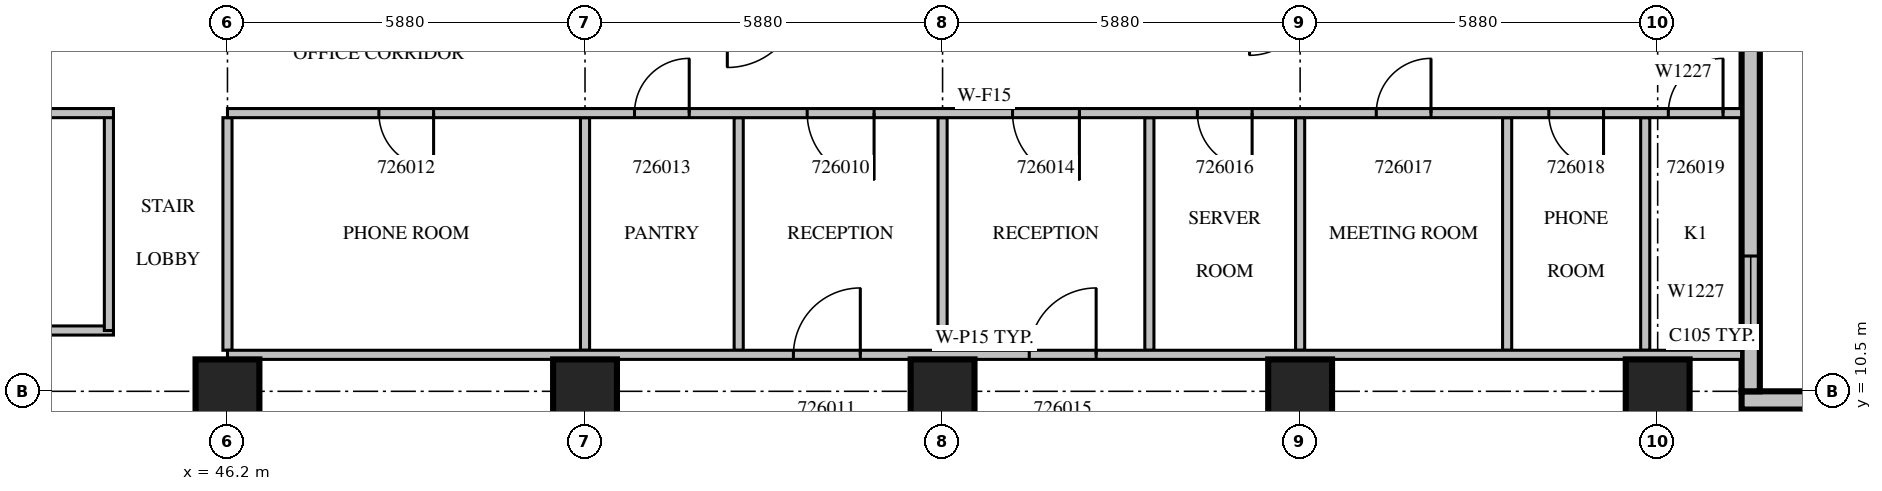
"""IFC4 building model, lengths in metres.
Left out: names, types, materials, properties, quantities, classifications, styles, units other than length and angle.
Written with IfcOpenShell. Run it as: python <this file> out.ifc"""

import sys

from ifc_helpers import new_model, si_unit, direction, frame, frame_2d, origin, origin_2d, place, context, subcontext, project, spatial, rectangle, extrude, source, transform, mapped, element, fill, save


model = new_model("IFC4")
c1 = context("Model", 3, precision=1e-05, world=origin(), true_north=direction((0.0, 1.0)))
c2 = subcontext(c1, "Body", "Model", "MODEL_VIEW")
j1 = project(units=[si_unit("LENGTHUNIT", "METRE"), si_unit("PLANEANGLEUNIT", "RADIAN")], contexts=[c1])
p1 = place(None, origin())
s1 = spatial("IfcSite", under=j1, at=p1, CompositionType="ELEMENT")
p2 = place(p1, origin())
s2 = spatial("IfcBuilding", under=s1, at=p2, CompositionType="ELEMENT")
p3 = place(p2, frame((0.0, 0.0, 120.3)))
s3 = spatial("IfcBuildingStorey", under=s2, at=p3, CompositionType="ELEMENT", Elevation=120.3)
m1 = source(origin(), c2, "Body", "SweptSolid", [
    extrude(rectangle(XDim=1.05, YDim=1.05, at=origin_2d()), origin(), (0.0, 0.0, 1.0), 4.2),
])
for number, where, z_axis, x_axis in (
    (1, (46.2, 10.5, 0.0), (0.0, 0.0, 1.0), (1.0, 0.0, 0.0)),
    (2, (52.08, 10.5, 0.0), (0.0, 0.0, 1.0), (1.0, 0.0, 0.0)),
    (3, (57.96, 10.5, 0.0), (0.0, 0.0, 1.0), (1.0, 0.0, 0.0)),
    (4, (63.84, 10.5, 0.0), (0.0, 0.0, 1.0), (1.0, 0.0, 0.0)),
    (5, (69.72, 10.5, 0.0), (0.0, 0.0, 1.0), (1.0, 0.0, 0.0)),
):
    element("IfcColumn", number, at=place(p3, frame(where, z_axis=z_axis, x_axis=x_axis)), inside=s3, PredefinedType="COLUMN", context=c2, shape_type="MappedRepresentation", body=[
        mapped(m1, transform((0.0, 0.0, 0.0), scale=1.0)),
    ])
m2 = source(origin(), c2, "Body", "SweptSolid", [
    extrude(rectangle(XDim=1.2, YDim=0.3, at=frame_2d((0.6, 0.0))), origin(), (0.0, 0.0, 1.0), 3.8),
])
p4 = place(p3, frame((71.1, 10.35, 0.0), z_axis=(0.0, 0.0, 1.0), x_axis=(1.0, 0.0, 0.0)))
e6 = element("IfcWall", 6, at=p4, inside=s3, PredefinedType="STANDARD", context=c2, shape_type="MappedRepresentation", body=[
    mapped(m2, transform((0.0, 0.0, 0.0), scale=1.0)),
])
m3 = source(origin(), c2, "Body", "SweptSolid", [
    extrude(rectangle(XDim=6.3, YDim=0.3, at=frame_2d((3.15, 0.0))), origin(), (0.0, 0.0, 1.0), 3.8),
])
p5 = place(p3, frame((71.25, 10.5, 0.0), z_axis=(0.0, 0.0, 1.0), x_axis=(0.0, 1.0, 0.0)))
e7 = element("IfcWall", 7, at=p5, inside=s3, PredefinedType="STANDARD", context=c2, shape_type="MappedRepresentation", body=[
    mapped(m3, transform((0.0, 0.0, 0.0), scale=1.0)),
])
m4 = source(origin(), c2, "Body", "SweptSolid", [
    extrude(rectangle(XDim=1.2, YDim=2.7, at=frame_2d((0.6, 1.35))), frame((0.0, 0.16, 0.0), z_axis=(0.0, -1.0, 0.0), x_axis=(1.0, 0.0, 0.0)), (0.0, 0.0, 1.0), 0.32),
])
p6 = place(p5, frame((1.025, 0.0, 0.6)))
e8 = element("IfcOpeningElement", 8, at=p6, cuts=e7, PredefinedType="OPENING", context=c2, shape_type="MappedRepresentation", body=[
    mapped(m4, transform((0.0, 0.0, 0.0), scale=1.0)),
])
m5 = source(origin(), c2, "Body", "SweptSolid", [
    extrude(rectangle(XDim=6.45, YDim=0.15, at=frame_2d((3.225, 0.0))), origin(), (0.0, 0.0, 1.0), 3.8),
])
p7 = place(p3, frame((37.875, 11.5, 0.0), z_axis=(0.0, 0.0, 1.0), x_axis=(1.0, 0.0, 0.0)))
e9 = element("IfcWall", 9, at=p7, inside=s3, PredefinedType="PARTITIONING", context=c2, shape_type="MappedRepresentation", body=[
    mapped(m5, transform((0.0, 0.0, 0.0), scale=1.0)),
])
m6 = source(origin(), c2, "Body", "SweptSolid", [
    extrude(rectangle(XDim=3.575, YDim=0.15, at=frame_2d((1.788, 0.0))), origin(), (0.0, 0.0, 1.0), 3.8),
])
p8 = place(p3, frame((44.25, 11.5, 0.0), z_axis=(0.0, 0.0, 1.0), x_axis=(0.0, 1.0, 0.0)))
e10 = element("IfcWall", 10, at=p8, inside=s3, PredefinedType="PARTITIONING", context=c2, shape_type="MappedRepresentation", body=[
    mapped(m6, transform((0.0, 0.0, 0.0), scale=1.0)),
])
p9 = place(p3, frame((44.325, 15.075, 0.0), z_axis=(0.0, 0.0, 1.0), x_axis=(-1.0, 0.0, 0.0)))
e11 = element("IfcWall", 11, at=p9, inside=s3, PredefinedType="PARTITIONING", context=c2, shape_type="MappedRepresentation", body=[
    mapped(m5, transform((0.0, 0.0, 0.0), scale=1.0)),
])
m7 = source(origin(), c2, "Body", "SweptSolid", [
    extrude(rectangle(XDim=0.9, YDim=2.1, at=frame_2d((0.45, 1.05))), frame((0.0, 0.085, 0.0), z_axis=(0.0, -1.0, 0.0), x_axis=(1.0, 0.0, 0.0)), (0.0, 0.0, 1.0), 0.17),
])
p10 = place(p9, frame((2.812, 0.0, 0.0)))
e12 = element("IfcOpeningElement", 12, at=p10, cuts=e11, PredefinedType="OPENING", context=c2, shape_type="MappedRepresentation", body=[
    mapped(m7, transform((0.0, 0.0, 0.0), scale=1.0)),
])
m8 = source(origin(), c2, "Body", "SweptSolid", [
    extrude(rectangle(XDim=3.825, YDim=0.15, at=frame_2d((1.913, 0.0))), origin(), (0.0, 0.0, 1.0), 3.8),
])
for number, where, z_axis, x_axis in (
    (13, (52.08, 11.175, 0.0), (0.0, 0.0, 1.0), (0.0, 1.0, 0.0)),
    (14, (54.607, 11.175, 0.0), (0.0, 0.0, 1.0), (0.0, 1.0, 0.0)),
    (15, (61.361, 11.175, 0.0), (0.0, 0.0, 1.0), (0.0, 1.0, 0.0)),
    (16, (63.84, 11.175, 0.0), (0.0, 0.0, 1.0), (0.0, 1.0, 0.0)),
    (17, (67.244, 11.175, 0.0), (0.0, 0.0, 1.0), (0.0, 1.0, 0.0)),
    (18, (69.515, 11.175, 0.0), (0.0, 0.0, 1.0), (0.0, 1.0, 0.0)),
    (19, (46.2, 11.175, 0.0), (0.0, 0.0, 1.0), (0.0, 1.0, 0.0)),
    (20, (57.96, 11.175, 0.0), (0.0, 0.0, 1.0), (0.0, 1.0, 0.0)),
):
    element("IfcWall", number, at=place(p3, frame(where, z_axis=z_axis, x_axis=x_axis)), inside=s3, PredefinedType="PARTITIONING", context=c2, shape_type="MappedRepresentation", body=[
        mapped(m8, transform((0.0, 0.0, 0.0), scale=1.0)),
    ])
m9 = source(origin(), c2, "Body", "SweptSolid", [
    extrude(rectangle(XDim=24.9, YDim=0.15, at=frame_2d((12.45, 0.0))), origin(), (0.0, 0.0, 1.0), 3.8),
])
p11 = place(p3, frame((71.1, 11.1, 0.0), z_axis=(0.0, 0.0, 1.0), x_axis=(-1.0, 0.0, 0.0)))
e21 = element("IfcWall", 21, at=p11, inside=s3, PredefinedType="PARTITIONING", context=c2, shape_type="MappedRepresentation", body=[
    mapped(m9, transform((0.0, 0.0, 0.0), scale=1.0)),
])
m10 = source(origin(), c2, "Body", "SweptSolid", [
    extrude(rectangle(XDim=1.1, YDim=2.1, at=frame_2d((0.55, 1.05))), frame((0.0, 0.085, 0.0), z_axis=(0.0, -1.0, 0.0), x_axis=(1.0, 0.0, 0.0)), (0.0, 0.0, 1.0), 0.17),
])
p12 = place(p11, frame((14.493, 0.0, 0.0)))
e22 = element("IfcOpeningElement", 22, at=p12, cuts=e21, PredefinedType="OPENING", context=c2, shape_type="MappedRepresentation", body=[
    mapped(m10, transform((0.0, 0.0, 0.0), scale=1.0)),
])
p13 = place(p11, frame((10.614, 0.0, 0.0)))
e23 = element("IfcOpeningElement", 23, at=p13, cuts=e21, PredefinedType="OPENING", context=c2, shape_type="MappedRepresentation", body=[
    mapped(m10, transform((0.0, 0.0, 0.0), scale=1.0)),
])
p14 = place(p3, frame((71.1, 15.075, 0.0), z_axis=(0.0, 0.0, 1.0), x_axis=(-1.0, 0.0, 0.0)))
e24 = element("IfcWall", 24, at=p14, inside=s3, PredefinedType="PARTITIONING", context=c2, shape_type="MappedRepresentation", body=[
    mapped(m9, transform((0.0, 0.0, 0.0), scale=1.0)),
])
p15 = place(p14, frame((14.266, 0.0, 0.0)))
e25 = element("IfcOpeningElement", 25, at=p15, cuts=e24, PredefinedType="OPENING", context=c2, shape_type="MappedRepresentation", body=[
    mapped(m10, transform((0.0, 0.0, 0.0), scale=1.0)),
])
p16 = place(p14, frame((21.51, 0.0, 0.0)))
e26 = element("IfcOpeningElement", 26, at=p16, cuts=e24, PredefinedType="OPENING", context=c2, shape_type="MappedRepresentation", body=[
    mapped(m7, transform((0.0, 0.0, 0.0), scale=1.0)),
])
p17 = place(p14, frame((17.306, 0.0, 0.0)))
e27 = element("IfcOpeningElement", 27, at=p17, cuts=e24, PredefinedType="OPENING", context=c2, shape_type="MappedRepresentation", body=[
    mapped(m7, transform((0.0, 0.0, 0.0), scale=1.0)),
])
p18 = place(p14, frame((10.889, 0.0, 0.0)))
e28 = element("IfcOpeningElement", 28, at=p18, cuts=e24, PredefinedType="OPENING", context=c2, shape_type="MappedRepresentation", body=[
    mapped(m10, transform((0.0, 0.0, 0.0), scale=1.0)),
])
p19 = place(p14, frame((8.05, 0.0, 0.0)))
e29 = element("IfcOpeningElement", 29, at=p19, cuts=e24, PredefinedType="OPENING", context=c2, shape_type="MappedRepresentation", body=[
    mapped(m7, transform((0.0, 0.0, 0.0), scale=1.0)),
])
p20 = place(p14, frame((5.108, 0.0, 0.0)))
e30 = element("IfcOpeningElement", 30, at=p20, cuts=e24, PredefinedType="OPENING", context=c2, shape_type="MappedRepresentation", body=[
    mapped(m7, transform((0.0, 0.0, 0.0), scale=1.0)),
])
p21 = place(p14, frame((2.27, 0.0, 0.0)))
e31 = element("IfcOpeningElement", 31, at=p21, cuts=e24, PredefinedType="OPENING", context=c2, shape_type="MappedRepresentation", body=[
    mapped(m7, transform((0.0, 0.0, 0.0), scale=1.0)),
])
p22 = place(p14, frame((0.305, 0.0, 0.0)))
e32 = element("IfcOpeningElement", 32, at=p22, cuts=e24, PredefinedType="OPENING", context=c2, shape_type="MappedRepresentation", body=[
    mapped(m7, transform((0.0, 0.0, 0.0), scale=1.0)),
])
m11 = source(origin(), c2, "Body", "SweptSolid", [
    extrude(rectangle(XDim=1.2, YDim=2.7, at=frame_2d((0.6, 1.35))), frame((0.0, 0.03, 0.0), z_axis=(0.0, -1.0, 0.0), x_axis=(1.0, 0.0, 0.0)), (0.0, 0.0, 1.0), 0.06),
])
p23 = place(p6, origin())
e33 = element("IfcWindow", 33, at=p23, inside=s3, PartitioningType="SINGLE_PANEL", PredefinedType="WINDOW", context=c2, shape_type="MappedRepresentation", body=[
    mapped(m11, transform((0.0, 0.0, 0.0), scale=1.0)),
])
fill(e8, e33)
m12 = source(origin(), c2, "Body", "SweptSolid", [
    extrude(rectangle(XDim=1.1, YDim=2.1, at=frame_2d((0.55, 1.05))), frame((0.0, 0.025, 0.0), z_axis=(0.0, -1.0, 0.0), x_axis=(1.0, 0.0, 0.0)), (0.0, 0.0, 1.0), 0.05),
])
p24 = place(p15, origin())
e34 = element("IfcDoor", 34, at=p24, inside=s3, OperationType="SINGLE_SWING_LEFT", PredefinedType="DOOR", context=c2, shape_type="MappedRepresentation", body=[
    mapped(m12, transform((0.0, 0.0, 0.0), scale=1.0)),
])
fill(e25, e34)
p25 = place(p12, origin())
e35 = element("IfcDoor", 35, at=p25, inside=s3, OperationType="SINGLE_SWING_RIGHT", PredefinedType="DOOR", context=c2, shape_type="MappedRepresentation", body=[
    mapped(m12, transform((0.0, 0.0, 0.0), scale=1.0)),
])
fill(e22, e35)
m13 = source(origin(), c2, "Body", "SweptSolid", [
    extrude(rectangle(XDim=0.9, YDim=2.1, at=frame_2d((0.45, 1.05))), frame((0.0, 0.025, 0.0), z_axis=(0.0, -1.0, 0.0), x_axis=(1.0, 0.0, 0.0)), (0.0, 0.0, 1.0), 0.05),
])
p26 = place(p16, origin())
e36 = element("IfcDoor", 36, at=p26, inside=s3, OperationType="SINGLE_SWING_LEFT", PredefinedType="DOOR", context=c2, shape_type="MappedRepresentation", body=[
    mapped(m13, transform((0.0, 0.0, 0.0), scale=1.0)),
])
fill(e26, e36)
p27 = place(p17, origin())
e37 = element("IfcDoor", 37, at=p27, inside=s3, OperationType="SINGLE_SWING_RIGHT", PredefinedType="DOOR", context=c2, shape_type="MappedRepresentation", body=[
    mapped(m13, transform((0.0, 0.0, 0.0), scale=1.0)),
])
fill(e27, e37)
p28 = place(p18, origin())
e38 = element("IfcDoor", 38, at=p28, inside=s3, OperationType="SINGLE_SWING_LEFT", PredefinedType="DOOR", context=c2, shape_type="MappedRepresentation", body=[
    mapped(m12, transform((0.0, 0.0, 0.0), scale=1.0)),
])
fill(e28, e38)
p29 = place(p13, origin())
e39 = element("IfcDoor", 39, at=p29, inside=s3, OperationType="SINGLE_SWING_RIGHT", PredefinedType="DOOR", context=c2, shape_type="MappedRepresentation", body=[
    mapped(m12, transform((0.0, 0.0, 0.0), scale=1.0)),
])
fill(e23, e39)
p30 = place(p19, origin())
e40 = element("IfcDoor", 40, at=p30, inside=s3, OperationType="SINGLE_SWING_LEFT", PredefinedType="DOOR", context=c2, shape_type="MappedRepresentation", body=[
    mapped(m13, transform((0.0, 0.0, 0.0), scale=1.0)),
])
fill(e29, e40)
p31 = place(p20, origin())
e41 = element("IfcDoor", 41, at=p31, inside=s3, OperationType="SINGLE_SWING_RIGHT", PredefinedType="DOOR", context=c2, shape_type="MappedRepresentation", body=[
    mapped(m13, transform((0.0, 0.0, 0.0), scale=1.0)),
])
fill(e30, e41)
p32 = place(p21, origin())
e42 = element("IfcDoor", 42, at=p32, inside=s3, OperationType="SINGLE_SWING_LEFT", PredefinedType="DOOR", context=c2, shape_type="MappedRepresentation", body=[
    mapped(m13, transform((0.0, 0.0, 0.0), scale=1.0)),
])
fill(e31, e42)
p33 = place(p22, origin())
e43 = element("IfcDoor", 43, at=p33, inside=s3, OperationType="SINGLE_SWING_RIGHT", PredefinedType="DOOR", context=c2, shape_type="MappedRepresentation", body=[
    mapped(m13, transform((0.0, 0.0, 0.0), scale=1.0)),
])
fill(e32, e43)
save(model, sys.argv[1])
